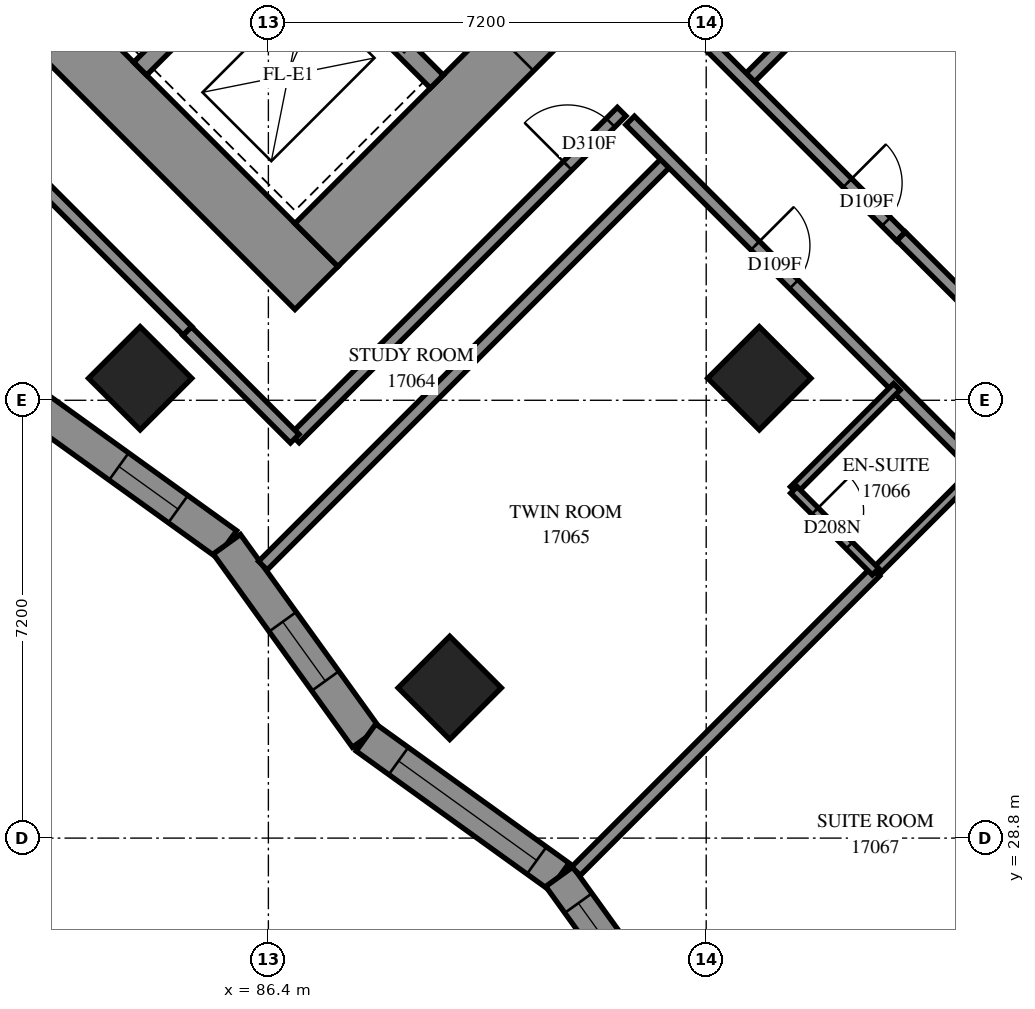
"""IFC4 building model, lengths in metres.
Left out: names, types, materials, properties, quantities, classifications, styles, units other than length and angle.
Written with IfcOpenShell. Run it as: python <this file> out.ifc"""

import sys

from ifc_helpers import new_model, si_unit, direction, frame, frame_2d, origin, origin_2d, place, context, subcontext, project, spatial, polyline, rectangle, outline, extrude, element, fill, save


model = new_model("IFC4")
c1 = context("Model", 3, precision=1e-05, world=origin(), true_north=direction((0.0, 1.0)))
c2 = subcontext(c1, "Body", "Model", "MODEL_VIEW")
j1 = project(units=[si_unit("LENGTHUNIT", "METRE"), si_unit("PLANEANGLEUNIT", "RADIAN")], contexts=[c1])
p1 = place(None, origin())
s1 = spatial("IfcSite", under=j1, at=p1, CompositionType="ELEMENT")
p2 = place(p1, origin())
s2 = spatial("IfcBuilding", under=s1, at=p2, CompositionType="ELEMENT")
p3 = place(p2, frame((0.0, 0.0, 64.4)))
s3 = spatial("IfcBuildingStorey", under=s2, at=p3, CompositionType="ELEMENT", Elevation=64.4)
for number, where, z_axis, x_axis in (
    (1, (84.291, 36.362, 0.0), (0.0, 0.0, 1.0), (0.707, -0.707, 0.0)),
    (2, (94.474, 36.362, 0.0), (0.0, 0.0, 1.0), (0.707, -0.707, 0.0)),
    (3, (89.382, 31.271, 0.0), (0.0, 0.0, 1.0), (0.707, -0.707, 0.0)),
):
    element("IfcColumn", number, at=place(p3, frame(where, z_axis=z_axis, x_axis=x_axis)), inside=s3, PredefinedType="COLUMN", context=c2, shape_type="SweptSolid", body=[
        extrude(rectangle(XDim=1.2, YDim=1.2, at=origin_2d()), origin(), (0.0, 0.0, 1.0), 3.1),
    ])
p4 = place(p3, frame((75.594, 49.443, -0.3), z_axis=(0.0, 0.0, 1.0), x_axis=(0.7071037324, -0.70710983, 0.0)))
e4 = element("IfcWall", 4, at=p4, inside=s3, PredefinedType="SHEAR", context=c2, shape_type="SweptSolid", body=[
    extrude(rectangle(XDim=16.4, YDim=1.0, at=frame_2d((8.2, 0.0))), origin(), (0.0, 0.0, 1.0), 2.7),
])
p5 = place(p3, frame((87.19, 38.554, -0.3), z_axis=(0.0, 0.0, 1.0), x_axis=(0.707103309, 0.7071102534, 0.0)))
e5 = element("IfcWall", 5, at=p5, inside=s3, PredefinedType="SHEAR", context=c2, shape_type="SweptSolid", body=[
    extrude(rectangle(XDim=14.4, YDim=1.0, at=frame_2d((7.2, 0.0))), origin(), (0.0, 0.0, 1.0), 2.7),
])
p6 = place(p5, frame((4.55, 0.0, 0.3)))
e6 = element("IfcOpeningElement", 6, at=p6, cuts=e5, PredefinedType="OPENING", context=c2, shape_type="SweptSolid", body=[
    extrude(rectangle(XDim=1.1, YDim=2.1, at=frame_2d((0.55, 1.05))), frame((0.0, 0.51, 0.0), z_axis=(0.0, -1.0, 0.0), x_axis=(1.0, 0.0, 0.0)), (0.0, 0.0, 1.0), 1.02),
])
p7 = place(p5, frame((11.35, 0.0, 0.3)))
e7 = element("IfcOpeningElement", 7, at=p7, cuts=e5, PredefinedType="OPENING", context=c2, shape_type="SweptSolid", body=[
    extrude(rectangle(XDim=1.1, YDim=2.1, at=frame_2d((0.55, 1.05))), frame((0.0, 0.51, 0.0), z_axis=(0.0, -1.0, 0.0), x_axis=(1.0, 0.0, 0.0)), (0.0, 0.0, 1.0), 1.02),
])
p8 = place(p3, frame((84.291, 41.453, 0.0), z_axis=(0.0, 0.0, 1.0), x_axis=(0.7071067812, 0.7071067812, 0.0)))
e8 = element("IfcWall", 8, at=p8, inside=s3, PredefinedType="SOLIDWALL", context=c2, shape_type="SweptSolid", body=[
    extrude(rectangle(XDim=3.3, YDim=0.3, at=frame_2d((1.65, 0.0))), origin(), (0.0, 0.0, 1.0), 3.1),
])
p9 = place(p3, frame((78.988, 51.423, 0.0), z_axis=(0.0, 0.0, 1.0), x_axis=(0.7071067812, -0.7071067812, 0.0)))
e9 = element("IfcWall", 9, at=p9, inside=s3, PredefinedType="SOLIDWALL", context=c2, shape_type="SweptSolid", body=[
    extrude(rectangle(XDim=14.4, YDim=0.3, at=frame_2d((7.2, 0.0))), origin(), (0.0, 0.0, 1.0), 3.1),
])
p10 = place(p9, frame((1.25, 0.0, 0.0)))
e10 = element("IfcOpeningElement", 10, at=p10, cuts=e9, PredefinedType="OPENING", context=c2, shape_type="SweptSolid", body=[
    extrude(rectangle(XDim=1.1, YDim=2.1, at=frame_2d((0.55, 1.05))), frame((0.0, 0.16, 0.0), z_axis=(0.0, -1.0, 0.0), x_axis=(1.0, 0.0, 0.0)), (0.0, 0.0, 1.0), 0.32),
])
p11 = place(p9, frame((4.85, 0.0, 0.0)))
e11 = element("IfcOpeningElement", 11, at=p11, cuts=e9, PredefinedType="OPENING", context=c2, shape_type="SweptSolid", body=[
    extrude(rectangle(XDim=1.1, YDim=2.1, at=frame_2d((0.55, 1.05))), frame((0.0, 0.16, 0.0), z_axis=(0.0, -1.0, 0.0), x_axis=(1.0, 0.0, 0.0)), (0.0, 0.0, 1.0), 0.32),
])
p12 = place(p9, frame((8.45, 0.0, 0.0)))
e12 = element("IfcOpeningElement", 12, at=p12, cuts=e9, PredefinedType="OPENING", context=c2, shape_type="SweptSolid", body=[
    extrude(rectangle(XDim=1.1, YDim=2.1, at=frame_2d((0.55, 1.05))), frame((0.0, 0.16, 0.0), z_axis=(0.0, -1.0, 0.0), x_axis=(1.0, 0.0, 0.0)), (0.0, 0.0, 1.0), 0.32),
])
p13 = place(p9, frame((12.05, 0.0, 0.0)))
e13 = element("IfcOpeningElement", 13, at=p13, cuts=e9, PredefinedType="OPENING", context=c2, shape_type="SweptSolid", body=[
    extrude(rectangle(XDim=1.1, YDim=2.1, at=frame_2d((0.55, 1.05))), frame((0.0, 0.16, 0.0), z_axis=(0.0, -1.0, 0.0), x_axis=(1.0, 0.0, 0.0)), (0.0, 0.0, 1.0), 0.32),
])
p14 = place(p3, frame((82.538, 35.921, 0.0), z_axis=(0.0, 0.0, 1.0), x_axis=(0.8116340803, -0.5841661747, 0.0)))
e14 = element("IfcWall", 14, at=p14, inside=s3, PredefinedType="SOLIDWALL", context=c2, shape_type="SweptSolid", body=[
    extrude(outline(polyline([(-0.045, -0.275), (3.872, -0.275), (3.962, 0.275), (0.045, 0.275), (-0.045, -0.275)])), origin(), (0.0, 0.0, 1.0), 3.1),
])
p15 = place(p14, frame((1.729, 0.0, 0.5)))
e15 = element("IfcOpeningElement", 15, at=p15, cuts=e14, PredefinedType="OPENING", context=c2, shape_type="SweptSolid", body=[
    extrude(rectangle(XDim=1.2, YDim=2.45, at=frame_2d((0.6, 1.225))), frame((0.0, 0.285, 0.0), z_axis=(0.0, -1.0, 0.0), x_axis=(1.0, 0.0, 0.0)), (0.0, 0.0, 1.0), 0.57),
])
p16 = place(p3, frame((85.717, 33.633, 0.0), z_axis=(0.0, 0.0, 1.0), x_axis=(0.5841661747, -0.8116340803, 0.0)))
e16 = element("IfcWall", 16, at=p16, inside=s3, PredefinedType="SOLIDWALL", context=c2, shape_type="SweptSolid", body=[
    extrude(outline(polyline([(0.045, -0.275), (3.962, -0.275), (3.872, 0.275), (-0.045, 0.275), (0.045, -0.275)])), origin(), (0.0, 0.0, 1.0), 3.1),
])
p17 = place(p16, frame((1.571, 0.0, 0.5)))
e17 = element("IfcOpeningElement", 17, at=p17, cuts=e16, PredefinedType="OPENING", context=c2, shape_type="SweptSolid", body=[
    extrude(rectangle(XDim=1.2, YDim=2.45, at=frame_2d((0.6, 1.225))), frame((0.0, 0.285, 0.0), z_axis=(0.0, -1.0, 0.0), x_axis=(1.0, 0.0, 0.0)), (0.0, 0.0, 1.0), 0.57),
])
p18 = place(p3, frame((88.005, 30.454, 0.0), z_axis=(0.0, 0.0, 1.0), x_axis=(0.8116253681, -0.5841782792, 0.0)))
e18 = element("IfcWall", 18, at=p18, inside=s3, PredefinedType="SOLIDWALL", context=c2, shape_type="SweptSolid", body=[
    extrude(outline(polyline([(-0.045, -0.275), (3.872, -0.275), (3.962, 0.275), (0.045, 0.275), (-0.045, -0.275)])), origin(), (0.0, 0.0, 1.0), 3.1),
])
p19 = place(p18, frame((0.659, 0.0, 0.5)))
e19 = element("IfcOpeningElement", 19, at=p19, cuts=e18, PredefinedType="OPENING", context=c2, shape_type="SweptSolid", body=[
    extrude(rectangle(XDim=2.8, YDim=2.45, at=frame_2d((1.4, 1.225))), frame((0.0, 0.285, 0.0), z_axis=(0.0, -1.0, 0.0), x_axis=(1.0, 0.0, 0.0)), (0.0, 0.0, 1.0), 0.57),
])
p20 = place(p3, frame((91.184, 28.165, 0.0), z_axis=(0.0, 0.0, 1.0), x_axis=(0.5841782792, -0.8116253681, 0.0)))
e20 = element("IfcWall", 20, at=p20, inside=s3, PredefinedType="SOLIDWALL", context=c2, shape_type="SweptSolid", body=[
    extrude(outline(polyline([(0.045, -0.275), (3.962, -0.275), (3.872, 0.275), (-0.045, 0.275), (0.045, -0.275)])), origin(), (0.0, 0.0, 1.0), 3.1),
])
p21 = place(p20, frame((0.536, 0.0, 0.5)))
e21 = element("IfcOpeningElement", 21, at=p21, cuts=e20, PredefinedType="OPENING", context=c2, shape_type="SweptSolid", body=[
    extrude(rectangle(XDim=2.8, YDim=2.45, at=frame_2d((1.4, 1.225))), frame((0.0, 0.285, 0.0), z_axis=(0.0, -1.0, 0.0), x_axis=(1.0, 0.0, 0.0)), (0.0, 0.0, 1.0), 0.57),
])
p22 = place(p3, frame((94.259, 41.243, 0.0), z_axis=(0.0, 0.0, 1.0), x_axis=(0.7070206559, 0.7071928959, 0.0)))
e22 = element("IfcWall", 22, at=p22, inside=s3, PredefinedType="PARTITIONING", context=c2, shape_type="SweptSolid", body=[
    extrude(rectangle(XDim=12.192, YDim=0.2, at=frame_2d((6.096, 0.0))), origin(), (0.0, 0.0, 1.0), 3.1),
])
p23 = place(p3, frame((86.309, 33.281, 0.0), z_axis=(0.0, 0.0, 1.0), x_axis=(0.7069956745, 0.7072178704, 0.0)))
e23 = element("IfcWall", 23, at=p23, inside=s3, PredefinedType="PARTITIONING", context=c2, shape_type="SweptSolid", body=[
    extrude(rectangle(XDim=9.451, YDim=0.2, at=frame_2d((4.726, 0.0))), origin(), (0.0, 0.0, 1.0), 3.1),
])
p24 = place(p3, frame((92.349, 40.601, 0.0), z_axis=(0.0, 0.0, 1.0), x_axis=(0.7071067812, -0.7071067812, 0.0)))
e24 = element("IfcWall", 24, at=p24, inside=s3, PredefinedType="PARTITIONING", context=c2, shape_type="SweptSolid", body=[
    extrude(rectangle(XDim=8.101, YDim=0.2, at=frame_2d((4.05, 0.0))), origin(), (0.0, 0.0, 1.0), 3.1),
])
p25 = place(p24, frame((2.909, 0.0, 0.0)))
e25 = element("IfcOpeningElement", 25, at=p25, cuts=e24, PredefinedType="OPENING", context=c2, shape_type="SweptSolid", body=[
    extrude(rectangle(XDim=0.9, YDim=2.1, at=frame_2d((0.45, 1.05))), frame((0.0, 0.11, 0.0), z_axis=(0.0, -1.0, 0.0), x_axis=(1.0, 0.0, 0.0)), (0.0, 0.0, 1.0), 0.22),
])
p26 = place(p3, frame((86.836, 35.372, 0.0), z_axis=(0.0, 0.0, 1.0), x_axis=(0.7071067812, 0.7071067812, 0.0)))
e26 = element("IfcWall", 26, at=p26, inside=s3, PredefinedType="PARTITIONING", context=c2, shape_type="SweptSolid", body=[
    extrude(rectangle(XDim=7.6, YDim=0.2, at=frame_2d((3.8, 0.0))), origin(), (0.0, 0.0, 1.0), 3.1),
])
p27 = place(p26, frame((6.342, 0.0, 0.0)))
e27 = element("IfcOpeningElement", 27, at=p27, cuts=e26, PredefinedType="OPENING", context=c2, shape_type="SweptSolid", body=[
    extrude(rectangle(XDim=1.0, YDim=2.1, at=frame_2d((0.5, 1.05))), frame((0.0, 0.11, 0.0), z_axis=(0.0, -1.0, 0.0), x_axis=(1.0, 0.0, 0.0)), (0.0, 0.0, 1.0), 0.22),
])
p28 = place(p3, frame((96.517, 23.134, 0.0), z_axis=(0.0, 0.0, 1.0), x_axis=(0.7071139158, 0.7070996465, 0.0)))
e28 = element("IfcWall", 28, at=p28, inside=s3, PredefinedType="PARTITIONING", context=c2, shape_type="SweptSolid", body=[
    extrude(rectangle(XDim=7.008, YDim=0.2, at=frame_2d((3.504, 0.0))), origin(), (0.0, 0.0, 1.0), 3.1),
])
p29 = place(p3, frame((91.458, 28.256, 0.0), z_axis=(0.0, 0.0, 1.0), x_axis=(0.7071067812, 0.7071067812, 0.0)))
e29 = element("IfcWall", 29, at=p29, inside=s3, PredefinedType="PARTITIONING", context=c2, shape_type="SweptSolid", body=[
    extrude(rectangle(XDim=6.963, YDim=0.2, at=frame_2d((3.482, 0.0))), origin(), (0.0, 0.0, 1.0), 3.1),
])
p30 = place(p3, frame((85.07, 37.142, 0.0), z_axis=(0.0, 0.0, 1.0), x_axis=(-0.7070899851, 0.7071235769, 0.0)))
e30 = element("IfcWall", 30, at=p30, inside=s3, PredefinedType="PARTITIONING", context=c2, shape_type="SweptSolid", body=[
    extrude(rectangle(XDim=5.954, YDim=0.2, at=frame_2d((2.977, 0.0))), origin(), (0.0, 0.0, 1.0), 3.1),
])
p31 = place(p3, frame((93.481, 42.015, 0.0), z_axis=(0.0, 0.0, 1.0), x_axis=(0.7071067812, -0.7071067812, 0.0)))
e31 = element("IfcWall", 31, at=p31, inside=s3, PredefinedType="PARTITIONING", context=c2, shape_type="SweptSolid", body=[
    extrude(rectangle(XDim=4.698, YDim=0.2, at=frame_2d((2.349, 0.0))), origin(), (0.0, 0.0, 1.0), 3.1),
])
p32 = place(p31, frame((3.452, 0.0, 0.0)))
e32 = element("IfcOpeningElement", 32, at=p32, cuts=e31, PredefinedType="OPENING", context=c2, shape_type="SweptSolid", body=[
    extrude(rectangle(XDim=0.9, YDim=2.1, at=frame_2d((0.45, 1.05))), frame((0.0, 0.11, 0.0), z_axis=(0.0, -1.0, 0.0), x_axis=(1.0, 0.0, 0.0)), (0.0, 0.0, 1.0), 0.22),
])
p33 = place(p3, frame((85.065, 37.137, 0.0), z_axis=(0.0, 0.0, 1.0), x_axis=(0.7071067812, -0.7071067812, 0.0)))
e33 = element("IfcWall", 33, at=p33, inside=s3, PredefinedType="PARTITIONING", context=c2, shape_type="SweptSolid", body=[
    extrude(rectangle(XDim=2.5, YDim=0.2, at=frame_2d((1.25, 0.0))), origin(), (0.0, 0.0, 1.0), 3.1),
])
p34 = place(p3, frame((96.384, 33.178, 0.0), z_axis=(0.0, 0.0, 1.0), x_axis=(0.7075233388, 0.706689978, 0.0)))
e34 = element("IfcWall", 34, at=p34, inside=s3, PredefinedType="PARTITIONING", context=c2, shape_type="SweptSolid", body=[
    extrude(rectangle(XDim=2.4, YDim=0.15, at=frame_2d((1.2, 0.0))), origin(), (0.0, 0.0, 1.0), 3.1),
])
p35 = place(p3, frame((95.039, 34.525, 0.0), z_axis=(0.0, 0.0, 1.0), x_axis=(0.7071067812, 0.7071067812, 0.0)))
e35 = element("IfcWall", 35, at=p35, inside=s3, PredefinedType="PARTITIONING", context=c2, shape_type="SweptSolid", body=[
    extrude(rectangle(XDim=2.398, YDim=0.15, at=frame_2d((1.199, 0.0))), origin(), (0.0, 0.0, 1.0), 3.1),
])
p36 = place(p3, frame((95.042, 34.526, 0.0), z_axis=(0.0, 0.0, 1.0), x_axis=(0.7065800724, -0.7076330979, 0.0)))
e36 = element("IfcWall", 36, at=p36, inside=s3, PredefinedType="PARTITIONING", context=c2, shape_type="SweptSolid", body=[
    extrude(rectangle(XDim=1.899, YDim=0.15, at=frame_2d((0.95, 0.0))), origin(), (0.0, 0.0, 1.0), 3.1),
])
p37 = place(p36, frame((0.491, 0.0, 0.0)))
e37 = element("IfcOpeningElement", 37, at=p37, cuts=e36, PredefinedType="OPENING", context=c2, shape_type="SweptSolid", body=[
    extrude(rectangle(XDim=0.8, YDim=2.1, at=frame_2d((0.4, 1.05))), frame((0.0, 0.085, 0.0), z_axis=(0.0, -1.0, 0.0), x_axis=(1.0, 0.0, 0.0)), (0.0, 0.0, 1.0), 0.17),
])
p38 = place(p3, frame((96.806, 38.696, 0.0), z_axis=(0.0, 0.0, 1.0), x_axis=(0.7076943229, -0.7065187509, 0.0)))
e38 = element("IfcWall", 38, at=p38, inside=s3, PredefinedType="PARTITIONING", context=c2, shape_type="SweptSolid", body=[
    extrude(rectangle(XDim=1.701, YDim=0.2, at=frame_2d((0.851, 0.0))), origin(), (0.0, 0.0, 1.0), 3.1),
])
p39 = place(p15, origin())
e39 = element("IfcWindow", 39, at=p39, inside=s3, PartitioningType="SINGLE_PANEL", PredefinedType="WINDOW", context=c2, shape_type="SweptSolid", body=[
    extrude(rectangle(XDim=1.2, YDim=2.45, at=frame_2d((0.6, 1.225))), frame((0.0, 0.155, 0.0), z_axis=(0.0, -1.0, 0.0), x_axis=(1.0, 0.0, 0.0)), (0.0, 0.0, 1.0), 0.06),
])
fill(e15, e39)
p40 = place(p17, origin())
e40 = element("IfcWindow", 40, at=p40, inside=s3, PartitioningType="SINGLE_PANEL", PredefinedType="WINDOW", context=c2, shape_type="SweptSolid", body=[
    extrude(rectangle(XDim=1.2, YDim=2.45, at=frame_2d((0.6, 1.225))), frame((0.0, 0.155, 0.0), z_axis=(0.0, -1.0, 0.0), x_axis=(1.0, 0.0, 0.0)), (0.0, 0.0, 1.0), 0.06),
])
fill(e17, e40)
p41 = place(p19, origin())
e41 = element("IfcWindow", 41, at=p41, inside=s3, PartitioningType="SINGLE_PANEL", PredefinedType="WINDOW", context=c2, shape_type="SweptSolid", body=[
    extrude(rectangle(XDim=2.8, YDim=2.45, at=frame_2d((1.4, 1.225))), frame((0.0, 0.155, 0.0), z_axis=(0.0, -1.0, 0.0), x_axis=(1.0, 0.0, 0.0)), (0.0, 0.0, 1.0), 0.06),
])
fill(e19, e41)
p42 = place(p21, origin())
e42 = element("IfcWindow", 42, at=p42, inside=s3, PartitioningType="SINGLE_PANEL", PredefinedType="WINDOW", context=c2, shape_type="SweptSolid", body=[
    extrude(rectangle(XDim=2.8, YDim=2.45, at=frame_2d((1.4, 1.225))), frame((0.0, 0.155, 0.0), z_axis=(0.0, -1.0, 0.0), x_axis=(1.0, 0.0, 0.0)), (0.0, 0.0, 1.0), 0.06),
])
fill(e21, e42)
p43 = place(p32, origin())
e43 = element("IfcDoor", 43, at=p43, inside=s3, OperationType="SINGLE_SWING_RIGHT", PredefinedType="DOOR", context=c2, shape_type="SweptSolid", body=[
    extrude(rectangle(XDim=0.9, YDim=2.1, at=frame_2d((0.45, 1.05))), frame((0.0, 0.025, 0.0), z_axis=(0.0, -1.0, 0.0), x_axis=(1.0, 0.0, 0.0)), (0.0, 0.0, 1.0), 0.05),
])
fill(e32, e43)
p44 = place(p27, origin())
e44 = element("IfcDoor", 44, at=p44, inside=s3, OperationType="SINGLE_SWING_RIGHT", PredefinedType="DOOR", context=c2, shape_type="SweptSolid", body=[
    extrude(rectangle(XDim=1.0, YDim=2.1, at=frame_2d((0.5, 1.05))), frame((0.0, 0.025, 0.0), z_axis=(0.0, -1.0, 0.0), x_axis=(1.0, 0.0, 0.0)), (0.0, 0.0, 1.0), 0.05),
])
fill(e27, e44)
p45 = place(p25, origin())
e45 = element("IfcDoor", 45, at=p45, inside=s3, OperationType="SINGLE_SWING_LEFT", PredefinedType="DOOR", context=c2, shape_type="SweptSolid", body=[
    extrude(rectangle(XDim=0.9, YDim=2.1, at=frame_2d((0.45, 1.05))), frame((0.0, 0.025, 0.0), z_axis=(0.0, -1.0, 0.0), x_axis=(1.0, 0.0, 0.0)), (0.0, 0.0, 1.0), 0.05),
])
fill(e25, e45)
p46 = place(p37, origin())
e46 = element("IfcDoor", 46, at=p46, inside=s3, OperationType="SINGLE_SWING_RIGHT", PredefinedType="DOOR", context=c2, shape_type="SweptSolid", body=[
    extrude(rectangle(XDim=0.8, YDim=2.1, at=frame_2d((0.4, 1.05))), frame((0.0, 0.025, 0.0), z_axis=(0.0, -1.0, 0.0), x_axis=(1.0, 0.0, 0.0)), (0.0, 0.0, 1.0), 0.05),
])
fill(e37, e46)
save(model, sys.argv[1])
